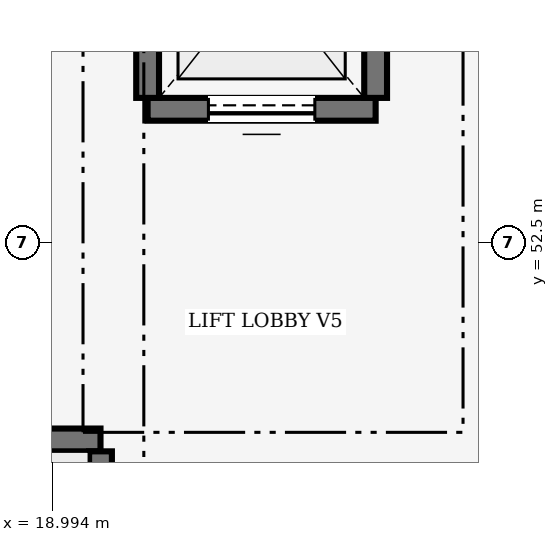
"""IFC4 building model, lengths in metres.
Left out: names, types, materials, properties, quantities, classifications, styles, units other than length and angle.
Written with IfcOpenShell. Run it as: python <this file> out.ifc"""

import sys

from ifc_helpers import new_model, si_unit, direction, frame, frame_2d, origin, place, context, subcontext, project, spatial, rectangle, extrude, element, fill, save


model = new_model("IFC4")
c1 = context("Model", 3, precision=1e-05, world=origin(), true_north=direction((0.0, 1.0)))
c2 = subcontext(c1, "Body", "Model", "MODEL_VIEW")
j1 = project(units=[si_unit("LENGTHUNIT", "METRE"), si_unit("PLANEANGLEUNIT", "RADIAN")], contexts=[c1])
p1 = place(None, origin())
s1 = spatial("IfcSite", under=j1, at=p1, CompositionType="ELEMENT")
p2 = place(p1, origin())
s2 = spatial("IfcBuilding", under=s1, at=p2, CompositionType="ELEMENT")
p3 = place(p2, frame((0.0, 0.0, 8.4)))
s3 = spatial("IfcBuildingStorey", under=s2, at=p3, CompositionType="ELEMENT", Elevation=8.4)
p4 = place(p3, frame((9.45, 49.9, 0.0), z_axis=(0.0, 0.0, 1.0), x_axis=(1.0, 0.0, 0.0)))
e1 = element("IfcWall", 1, at=p4, inside=s3, PredefinedType="SHEAR", context=c2, shape_type="SweptSolid", body=[
    extrude(rectangle(XDim=10.18, YDim=0.3, at=frame_2d((5.09, 0.0))), origin(), (0.0, 0.0, 1.0), 3.34),
])
p5 = place(p3, frame((19.63, 49.75, 0.0), z_axis=(0.0, 0.0, 1.0), x_axis=(0.0, -1.0, 0.0)))
e2 = element("IfcWall", 2, at=p5, inside=s3, PredefinedType="SHEAR", context=c2, shape_type="SweptSolid", body=[
    extrude(rectangle(XDim=4.15, YDim=0.3, at=frame_2d((2.075, 0.0))), origin(), (0.0, 0.0, 1.0), 3.34),
])
p6 = place(p3, frame((23.25, 54.25, 0.0), z_axis=(0.0, 0.0, 1.0), x_axis=(-1.0, 0.0, 0.0)))
e3 = element("IfcWall", 3, at=p6, inside=s3, PredefinedType="SHEAR", context=c2, shape_type="SweptSolid", body=[
    extrude(rectangle(XDim=3.0, YDim=0.3, at=frame_2d((1.5, 0.0))), origin(), (0.0, 0.0, 1.0), 3.34),
])
p7 = place(p6, frame((0.8, 0.0, 0.0)))
e4 = element("IfcOpeningElement", 4, at=p7, cuts=e3, PredefinedType="OPENING", context=c2, shape_type="SweptSolid", body=[
    extrude(rectangle(XDim=1.4, YDim=2.2, at=frame_2d((0.7, 1.1))), frame((0.0, 0.15, 0.0), z_axis=(0.0, -1.0, 0.0), x_axis=(1.0, 0.0, 0.0)), (0.0, 0.0, 1.0), 0.3),
])
for number, where, z_axis, x_axis in (
    (5, (20.25, 54.4, 0.0), (0.0, 0.0, 1.0), (0.0, 1.0, 0.0)),
    (6, (23.25, 57.7, 0.0), (0.0, 0.0, 1.0), (0.0, -1.0, 0.0)),
):
    element("IfcWall", number, at=place(p3, frame(where, z_axis=z_axis, x_axis=x_axis)), inside=s3, PredefinedType="SHEAR", context=c2, shape_type="SweptSolid", body=[
        extrude(rectangle(XDim=3.3, YDim=0.3, at=frame_2d((1.65, 0.0))), origin(), (0.0, 0.0, 1.0), 3.34),
    ])
p8 = place(p7, origin())
e7 = element("IfcDoor", 7, at=p8, inside=s3, OperationType="DOUBLE_DOOR_SLIDING", PredefinedType="DOOR", context=c2, shape_type="SweptSolid", body=[
    extrude(rectangle(XDim=1.4, YDim=2.2, at=frame_2d((0.7, 1.1))), frame((0.0, 0.025, 0.0), z_axis=(0.0, -1.0, 0.0), x_axis=(1.0, 0.0, 0.0)), (0.0, 0.0, 1.0), 0.05),
])
fill(e4, e7)
save(model, sys.argv[1])
